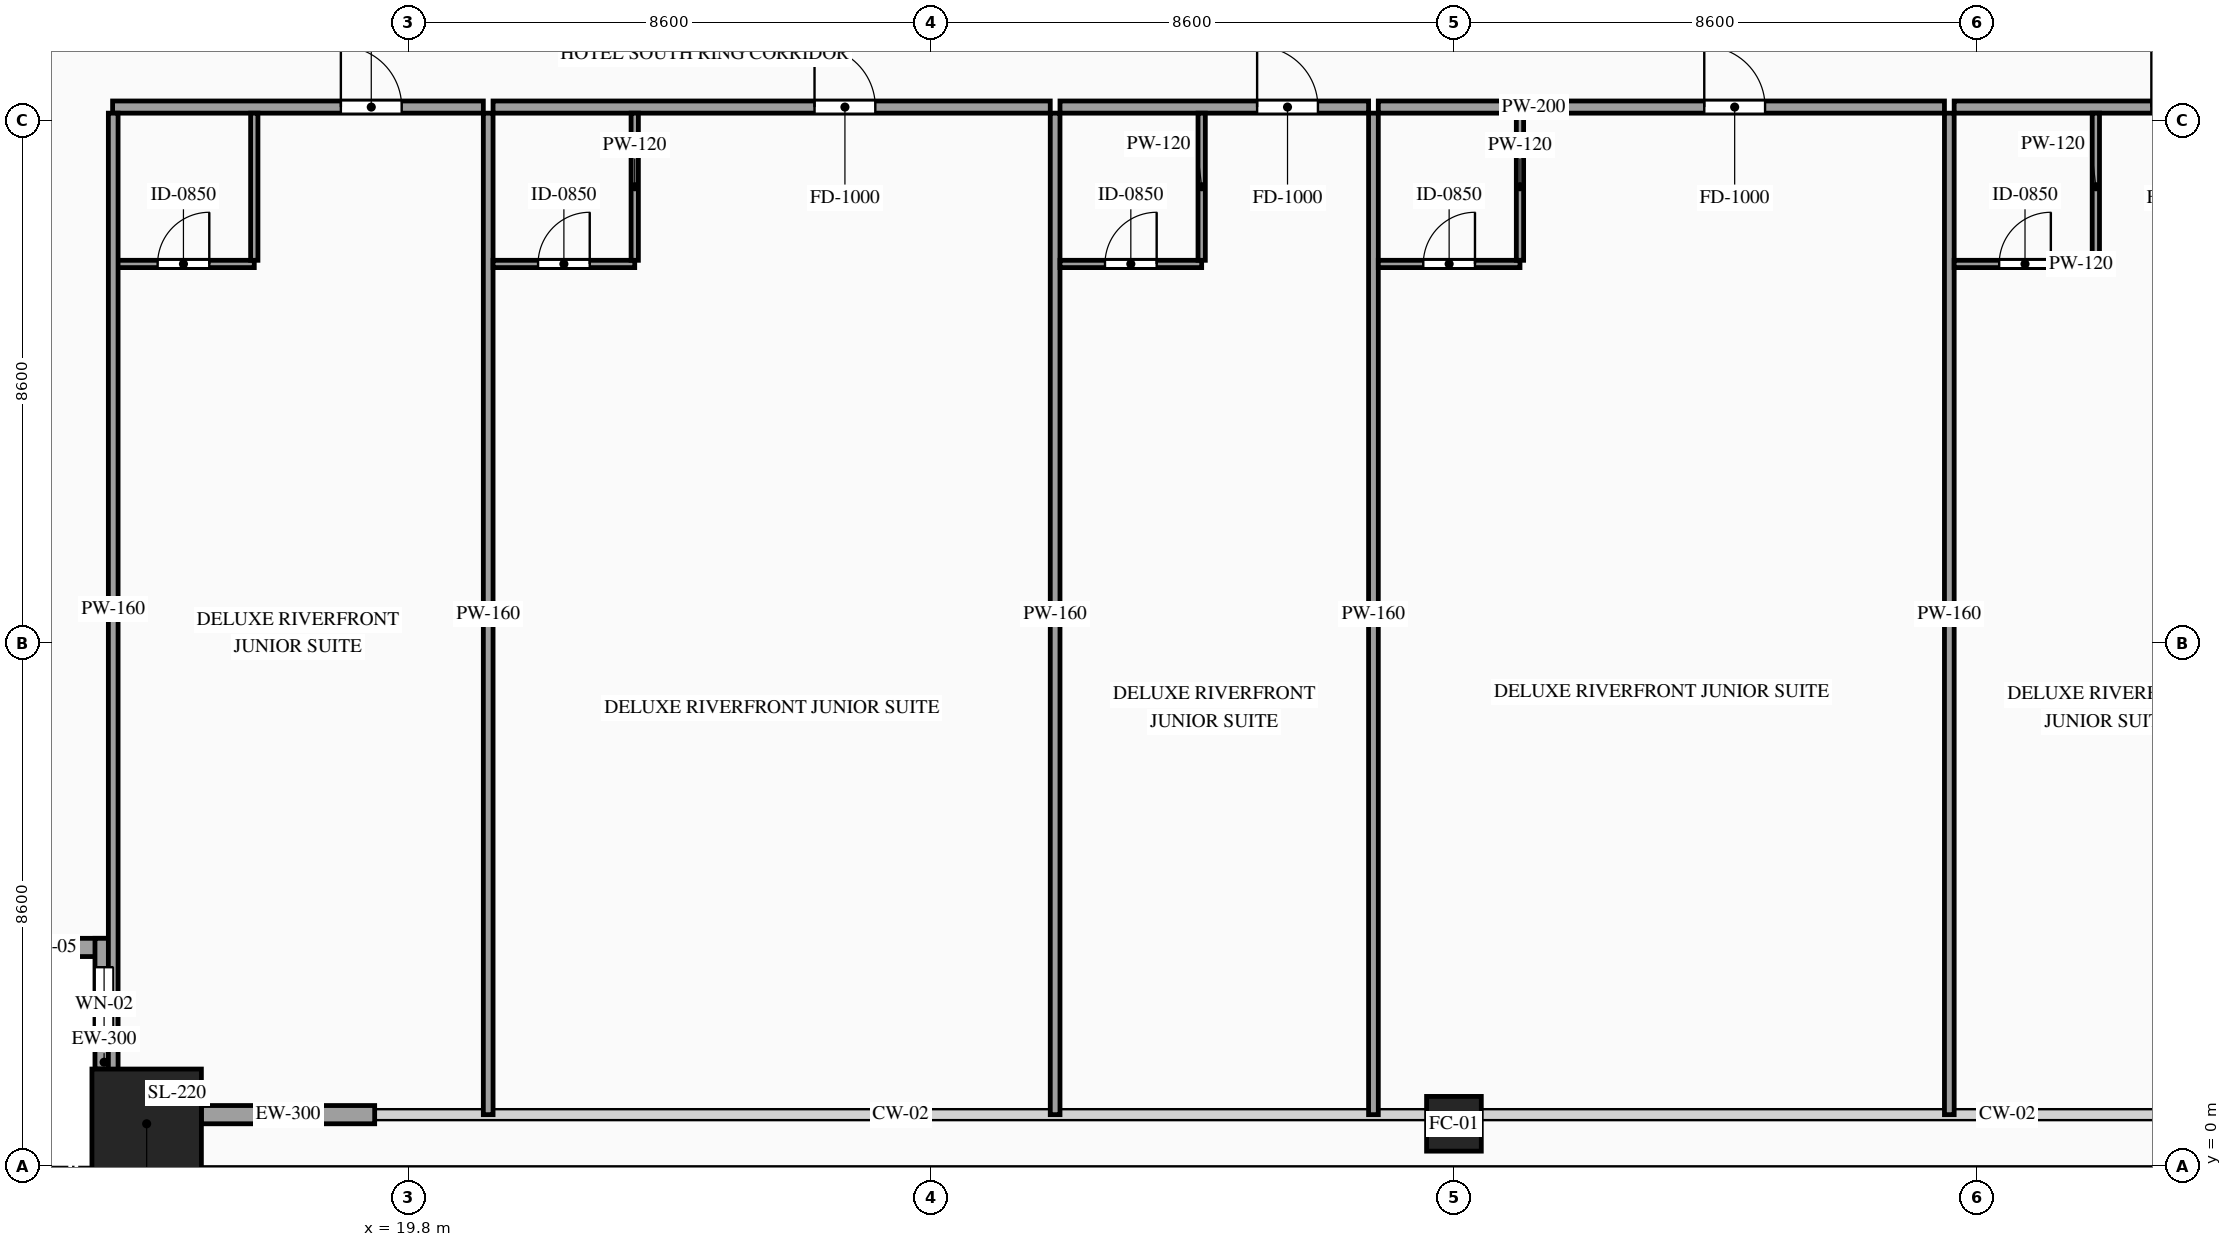
"""IFC4 building model, lengths in metres.
Left out: names, types, materials, properties, quantities, classifications, styles, units other than length and angle.
Written with IfcOpenShell. Run it as: python <this file> out.ifc"""

import sys

from ifc_helpers import new_model, si_unit, direction, frame, frame_2d, origin, origin_2d, place, context, subcontext, project, spatial, rectangle, hollow_rectangle, extrude, source, transform, mapped, element, fill, save


model = new_model("IFC4")
c1 = context("Model", 3, precision=1e-05, world=origin(), true_north=direction((0.0, 1.0)))
c2 = subcontext(c1, "Body", "Model", "MODEL_VIEW")
j1 = project(units=[si_unit("LENGTHUNIT", "METRE"), si_unit("PLANEANGLEUNIT", "RADIAN")], contexts=[c1])
p1 = place(None, origin())
s1 = spatial("IfcSite", under=j1, at=p1, CompositionType="ELEMENT")
p2 = place(p1, origin())
s2 = spatial("IfcBuilding", under=s1, at=p2, CompositionType="ELEMENT")
p3 = place(p2, frame((0.0, 0.0, 60.4)))
s3 = spatial("IfcBuildingStorey", under=s2, at=p3, CompositionType="ELEMENT", Elevation=60.4)
m1 = source(origin(), c2, "Body", "SweptSolid", [
    extrude(hollow_rectangle(XDim=1.8, YDim=1.8, WallThickness=0.08, at=origin_2d()), origin(), (0.0, 0.0, 1.0), 3.6),
])
p4 = place(p3, frame((15.5, 0.7, 0.0), z_axis=(0.0, 0.0, 1.0), x_axis=(1.0, 0.0, 0.0)))
e1 = element("IfcColumn", 1, at=p4, inside=s3, PredefinedType="COLUMN", context=c2, shape_type="MappedRepresentation", body=[
    mapped(m1, transform((0.0, 0.0, 0.0), scale=1.0)),
])
m2 = source(origin(), c2, "Body", "SweptSolid", [
    extrude(hollow_rectangle(XDim=0.9, YDim=0.9, WallThickness=0.042, at=origin_2d()), origin(), (0.0, 0.0, 1.0), 3.6),
])
p5 = place(p3, frame((37.0, 0.7, 0.0), z_axis=(0.0, 0.0, 1.0), x_axis=(1.0, 0.0, 0.0)))
e2 = element("IfcColumn", 2, at=p5, inside=s3, PredefinedType="COLUMN", context=c2, shape_type="MappedRepresentation", body=[
    mapped(m2, transform((0.0, 0.0, 0.0), scale=1.0)),
])
p6 = place(p3, frame((12.8, 3.6, 0.0), z_axis=(0.0, 0.0, 1.0), x_axis=(1.0, 0.0, 0.0)))
e3 = element("IfcWall", 3, at=p6, inside=s3, PredefinedType="SOLIDWALL", context=c2, shape_type="SweptSolid", body=[
    extrude(rectangle(XDim=2.15, YDim=0.3, at=frame_2d((1.075, 0.0))), origin(), (0.0, 0.0, 1.0), 3.38),
])
p7 = place(p6, frame((0.625, 0.0, 0.85)))
e4 = element("IfcOpeningElement", 4, at=p7, cuts=e3, PredefinedType="OPENING", context=c2, shape_type="SweptSolid", body=[
    extrude(rectangle(XDim=0.9, YDim=1.5, at=frame_2d((0.45, 0.75))), frame((0.0, 0.165, 0.0), z_axis=(0.0, -1.0, 0.0), x_axis=(1.0, 0.0, 0.0)), (0.0, 0.0, 1.0), 0.33),
])
p8 = place(p3, frame((14.8, 3.75, 0.0), z_axis=(0.0, 0.0, 1.0), x_axis=(0.0, -1.0, 0.0)))
e5 = element("IfcWall", 5, at=p8, inside=s3, PredefinedType="SOLIDWALL", context=c2, shape_type="SweptSolid", body=[
    extrude(rectangle(XDim=2.15, YDim=0.3, at=frame_2d((1.075, 0.0))), origin(), (0.0, 0.0, 1.0), 3.38),
])
p9 = place(p8, frame((0.475, 0.0, 0.85)))
e6 = element("IfcOpeningElement", 6, at=p9, cuts=e5, PredefinedType="OPENING", context=c2, shape_type="SweptSolid", body=[
    extrude(rectangle(XDim=1.2, YDim=2.1, at=frame_2d((0.6, 1.05))), frame((0.0, 0.165, 0.0), z_axis=(0.0, -1.0, 0.0), x_axis=(1.0, 0.0, 0.0)), (0.0, 0.0, 1.0), 0.33),
])
m3 = source(origin(), c2, "Body", "SweptSolid", [
    extrude(rectangle(XDim=2.85, YDim=0.3, at=frame_2d((1.425, 0.0))), origin(), (0.0, 0.0, 1.0), 2.775),
])
p10 = place(p3, frame((16.4, 0.85, 0.0), z_axis=(0.0, 0.0, 1.0), x_axis=(1.0, 0.0, 0.0)))
e7 = element("IfcWall", 7, at=p10, inside=s3, PredefinedType="SOLIDWALL", context=c2, shape_type="MappedRepresentation", body=[
    mapped(m3, transform((0.0, 0.0, 0.0), scale=1.0)),
])
p11 = place(p3, frame((14.94, 17.42, 0.0), z_axis=(0.0, 0.0, 1.0), x_axis=(1.0, 0.0, 0.0)))
e8 = element("IfcWall", 8, at=p11, inside=s3, PredefinedType="PARTITIONING", context=c2, shape_type="SweptSolid", body=[
    extrude(rectangle(XDim=6.097, YDim=0.2, at=frame_2d((3.049, 0.0))), origin(), (0.0, 0.0, 1.0), 3.38),
])
p12 = place(p11, frame((3.754, 0.0, 0.0)))
e9 = element("IfcOpeningElement", 9, at=p12, cuts=e8, PredefinedType="OPENING", context=c2, shape_type="SweptSolid", body=[
    extrude(rectangle(XDim=1.0, YDim=2.2, at=frame_2d((0.5, 1.1))), frame((0.0, 0.115, 0.0), z_axis=(0.0, -1.0, 0.0), x_axis=(1.0, 0.0, 0.0)), (0.0, 0.0, 1.0), 0.23),
])
m4 = source(origin(), c2, "Body", "SweptSolid", [
    extrude(rectangle(XDim=16.47, YDim=0.16, at=frame_2d((8.235, 0.0))), origin(), (0.0, 0.0, 1.0), 3.38),
])
p13 = place(p3, frame((21.117, 0.85, 0.0), z_axis=(0.0, 0.0, 1.0), x_axis=(0.0, 1.0, 0.0)))
e10 = element("IfcWall", 10, at=p13, inside=s3, PredefinedType="PARTITIONING", context=c2, shape_type="MappedRepresentation", body=[
    mapped(m4, transform((0.0, 0.0, 0.0), scale=1.0)),
])
p14 = place(p3, frame((14.94, 14.84, 0.0), z_axis=(0.0, 0.0, 1.0), x_axis=(1.0, 0.0, 0.0)))
e11 = element("IfcWall", 11, at=p14, inside=s3, PredefinedType="PARTITIONING", context=c2, shape_type="SweptSolid", body=[
    extrude(rectangle(XDim=2.33, YDim=0.12, at=frame_2d((1.165, 0.0))), origin(), (0.0, 0.0, 1.0), 3.38),
])
p15 = place(p14, frame((0.74, 0.0, 0.0)))
e12 = element("IfcOpeningElement", 12, at=p15, cuts=e11, PredefinedType="OPENING", context=c2, shape_type="SweptSolid", body=[
    extrude(rectangle(XDim=0.85, YDim=2.1, at=frame_2d((0.425, 1.05))), frame((0.0, 0.075, 0.0), z_axis=(0.0, -1.0, 0.0), x_axis=(1.0, 0.0, 0.0)), (0.0, 0.0, 1.0), 0.15),
])
m5 = source(origin(), c2, "Body", "SweptSolid", [
    extrude(rectangle(XDim=2.42, YDim=0.12, at=frame_2d((1.21, 0.0))), origin(), (0.0, 0.0, 1.0), 3.38),
])
p16 = place(p3, frame((17.27, 14.9, 0.0), z_axis=(0.0, 0.0, 1.0), x_axis=(0.0, 1.0, 0.0)))
e13 = element("IfcWall", 13, at=p16, inside=s3, PredefinedType="PARTITIONING", context=c2, shape_type="MappedRepresentation", body=[
    mapped(m5, transform((0.0, 0.0, 0.0), scale=1.0)),
])
p17 = place(p3, frame((21.197, 17.42, 0.0), z_axis=(0.0, 0.0, 1.0), x_axis=(1.0, 0.0, 0.0)))
e14 = element("IfcWall", 14, at=p17, inside=s3, PredefinedType="PARTITIONING", context=c2, shape_type="SweptSolid", body=[
    extrude(rectangle(XDim=9.164, YDim=0.2, at=frame_2d((4.582, 0.0))), origin(), (0.0, 0.0, 1.0), 3.38),
])
p18 = place(p17, frame((5.287, 0.0, 0.0)))
e15 = element("IfcOpeningElement", 15, at=p18, cuts=e14, PredefinedType="OPENING", context=c2, shape_type="SweptSolid", body=[
    extrude(rectangle(XDim=1.0, YDim=2.2, at=frame_2d((0.5, 1.1))), frame((0.0, 0.115, 0.0), z_axis=(0.0, -1.0, 0.0), x_axis=(1.0, 0.0, 0.0)), (0.0, 0.0, 1.0), 0.23),
])
p19 = place(p3, frame((30.441, 0.85, 0.0), z_axis=(0.0, 0.0, 1.0), x_axis=(0.0, 1.0, 0.0)))
e16 = element("IfcWall", 16, at=p19, inside=s3, PredefinedType="PARTITIONING", context=c2, shape_type="MappedRepresentation", body=[
    mapped(m4, transform((0.0, 0.0, 0.0), scale=1.0)),
])
p20 = place(p3, frame((21.197, 14.84, 0.0), z_axis=(0.0, 0.0, 1.0), x_axis=(1.0, 0.0, 0.0)))
e17 = element("IfcWall", 17, at=p20, inside=s3, PredefinedType="PARTITIONING", context=c2, shape_type="SweptSolid", body=[
    extrude(rectangle(XDim=2.33, YDim=0.12, at=frame_2d((1.165, 0.0))), origin(), (0.0, 0.0, 1.0), 3.38),
])
p21 = place(p20, frame((0.74, 0.0, 0.0)))
e18 = element("IfcOpeningElement", 18, at=p21, cuts=e17, PredefinedType="OPENING", context=c2, shape_type="SweptSolid", body=[
    extrude(rectangle(XDim=0.85, YDim=2.1, at=frame_2d((0.425, 1.05))), frame((0.0, 0.075, 0.0), z_axis=(0.0, -1.0, 0.0), x_axis=(1.0, 0.0, 0.0)), (0.0, 0.0, 1.0), 0.15),
])
p22 = place(p3, frame((23.527, 14.9, 0.0), z_axis=(0.0, 0.0, 1.0), x_axis=(0.0, 1.0, 0.0)))
e19 = element("IfcWall", 19, at=p22, inside=s3, PredefinedType="PARTITIONING", context=c2, shape_type="MappedRepresentation", body=[
    mapped(m5, transform((0.0, 0.0, 0.0), scale=1.0)),
])
p23 = place(p3, frame((30.521, 17.42, 0.0), z_axis=(0.0, 0.0, 1.0), x_axis=(1.0, 0.0, 0.0)))
e20 = element("IfcWall", 20, at=p23, inside=s3, PredefinedType="PARTITIONING", context=c2, shape_type="SweptSolid", body=[
    extrude(rectangle(XDim=5.075, YDim=0.2, at=frame_2d((2.538, 0.0))), origin(), (0.0, 0.0, 1.0), 3.38),
])
p24 = place(p23, frame((3.242, 0.0, 0.0)))
e21 = element("IfcOpeningElement", 21, at=p24, cuts=e20, PredefinedType="OPENING", context=c2, shape_type="SweptSolid", body=[
    extrude(rectangle(XDim=1.0, YDim=2.2, at=frame_2d((0.5, 1.1))), frame((0.0, 0.115, 0.0), z_axis=(0.0, -1.0, 0.0), x_axis=(1.0, 0.0, 0.0)), (0.0, 0.0, 1.0), 0.23),
])
p25 = place(p3, frame((35.676, 0.85, 0.0), z_axis=(0.0, 0.0, 1.0), x_axis=(0.0, 1.0, 0.0)))
e22 = element("IfcWall", 22, at=p25, inside=s3, PredefinedType="PARTITIONING", context=c2, shape_type="MappedRepresentation", body=[
    mapped(m4, transform((0.0, 0.0, 0.0), scale=1.0)),
])
p26 = place(p3, frame((30.521, 14.84, 0.0), z_axis=(0.0, 0.0, 1.0), x_axis=(1.0, 0.0, 0.0)))
e23 = element("IfcWall", 23, at=p26, inside=s3, PredefinedType="PARTITIONING", context=c2, shape_type="SweptSolid", body=[
    extrude(rectangle(XDim=2.33, YDim=0.12, at=frame_2d((1.165, 0.0))), origin(), (0.0, 0.0, 1.0), 3.38),
])
p27 = place(p26, frame((0.74, 0.0, 0.0)))
e24 = element("IfcOpeningElement", 24, at=p27, cuts=e23, PredefinedType="OPENING", context=c2, shape_type="SweptSolid", body=[
    extrude(rectangle(XDim=0.85, YDim=2.1, at=frame_2d((0.425, 1.05))), frame((0.0, 0.075, 0.0), z_axis=(0.0, -1.0, 0.0), x_axis=(1.0, 0.0, 0.0)), (0.0, 0.0, 1.0), 0.15),
])
p28 = place(p3, frame((32.851, 14.9, 0.0), z_axis=(0.0, 0.0, 1.0), x_axis=(0.0, 1.0, 0.0)))
e25 = element("IfcWall", 25, at=p28, inside=s3, PredefinedType="PARTITIONING", context=c2, shape_type="MappedRepresentation", body=[
    mapped(m5, transform((0.0, 0.0, 0.0), scale=1.0)),
])
p29 = place(p3, frame((35.756, 17.42, 0.0), z_axis=(0.0, 0.0, 1.0), x_axis=(1.0, 0.0, 0.0)))
e26 = element("IfcWall", 26, at=p29, inside=s3, PredefinedType="PARTITIONING", context=c2, shape_type="SweptSolid", body=[
    extrude(rectangle(XDim=9.311, YDim=0.2, at=frame_2d((4.655, 0.0))), origin(), (0.0, 0.0, 1.0), 3.38),
])
p30 = place(p29, frame((5.361, 0.0, 0.0)))
e27 = element("IfcOpeningElement", 27, at=p30, cuts=e26, PredefinedType="OPENING", context=c2, shape_type="SweptSolid", body=[
    extrude(rectangle(XDim=1.0, YDim=2.2, at=frame_2d((0.5, 1.1))), frame((0.0, 0.115, 0.0), z_axis=(0.0, -1.0, 0.0), x_axis=(1.0, 0.0, 0.0)), (0.0, 0.0, 1.0), 0.23),
])
p31 = place(p3, frame((45.147, 0.85, 0.0), z_axis=(0.0, 0.0, 1.0), x_axis=(0.0, 1.0, 0.0)))
e28 = element("IfcWall", 28, at=p31, inside=s3, PredefinedType="PARTITIONING", context=c2, shape_type="MappedRepresentation", body=[
    mapped(m4, transform((0.0, 0.0, 0.0), scale=1.0)),
])
p32 = place(p3, frame((35.756, 14.84, 0.0), z_axis=(0.0, 0.0, 1.0), x_axis=(1.0, 0.0, 0.0)))
e29 = element("IfcWall", 29, at=p32, inside=s3, PredefinedType="PARTITIONING", context=c2, shape_type="SweptSolid", body=[
    extrude(rectangle(XDim=2.33, YDim=0.12, at=frame_2d((1.165, 0.0))), origin(), (0.0, 0.0, 1.0), 3.38),
])
p33 = place(p32, frame((0.74, 0.0, 0.0)))
e30 = element("IfcOpeningElement", 30, at=p33, cuts=e29, PredefinedType="OPENING", context=c2, shape_type="SweptSolid", body=[
    extrude(rectangle(XDim=0.85, YDim=2.1, at=frame_2d((0.425, 1.05))), frame((0.0, 0.075, 0.0), z_axis=(0.0, -1.0, 0.0), x_axis=(1.0, 0.0, 0.0)), (0.0, 0.0, 1.0), 0.15),
])
p34 = place(p3, frame((38.086, 14.9, 0.0), z_axis=(0.0, 0.0, 1.0), x_axis=(0.0, 1.0, 0.0)))
e31 = element("IfcWall", 31, at=p34, inside=s3, PredefinedType="PARTITIONING", context=c2, shape_type="MappedRepresentation", body=[
    mapped(m5, transform((0.0, 0.0, 0.0), scale=1.0)),
])
p35 = place(p3, frame((45.227, 17.42, 0.0), z_axis=(0.0, 0.0, 1.0), x_axis=(1.0, 0.0, 0.0)))
e32 = element("IfcWall", 32, at=p35, inside=s3, PredefinedType="PARTITIONING", context=c2, shape_type="SweptSolid", body=[
    extrude(rectangle(XDim=5.076, YDim=0.2, at=frame_2d((2.538, 0.0))), origin(), (0.0, 0.0, 1.0), 3.38),
])
p36 = place(p35, frame((3.243, 0.0, 0.0)))
e33 = element("IfcOpeningElement", 33, at=p36, cuts=e32, PredefinedType="OPENING", context=c2, shape_type="SweptSolid", body=[
    extrude(rectangle(XDim=1.0, YDim=2.2, at=frame_2d((0.5, 1.1))), frame((0.0, 0.115, 0.0), z_axis=(0.0, -1.0, 0.0), x_axis=(1.0, 0.0, 0.0)), (0.0, 0.0, 1.0), 0.23),
])
p37 = place(p3, frame((45.227, 14.84, 0.0), z_axis=(0.0, 0.0, 1.0), x_axis=(1.0, 0.0, 0.0)))
e34 = element("IfcWall", 34, at=p37, inside=s3, PredefinedType="PARTITIONING", context=c2, shape_type="SweptSolid", body=[
    extrude(rectangle(XDim=2.33, YDim=0.12, at=frame_2d((1.165, 0.0))), origin(), (0.0, 0.0, 1.0), 3.38),
])
p38 = place(p37, frame((0.74, 0.0, 0.0)))
e35 = element("IfcOpeningElement", 35, at=p38, cuts=e34, PredefinedType="OPENING", context=c2, shape_type="SweptSolid", body=[
    extrude(rectangle(XDim=0.85, YDim=2.1, at=frame_2d((0.425, 1.05))), frame((0.0, 0.075, 0.0), z_axis=(0.0, -1.0, 0.0), x_axis=(1.0, 0.0, 0.0)), (0.0, 0.0, 1.0), 0.15),
])
p39 = place(p3, frame((47.557, 14.9, 0.0), z_axis=(0.0, 0.0, 1.0), x_axis=(0.0, 1.0, 0.0)))
e36 = element("IfcWall", 36, at=p39, inside=s3, PredefinedType="PARTITIONING", context=c2, shape_type="MappedRepresentation", body=[
    mapped(m5, transform((0.0, 0.0, 0.0), scale=1.0)),
])
m6 = source(origin(), c2, "Body", "SweptSolid", [
    extrude(rectangle(XDim=16.32, YDim=0.16, at=frame_2d((8.16, 0.0))), origin(), (0.0, 0.0, 1.0), 3.38),
])
p40 = place(p3, frame((14.95, 1.0, 0.0), z_axis=(0.0, 0.0, 1.0), x_axis=(0.0, 1.0, 0.0)))
e37 = element("IfcWall", 37, at=p40, inside=s3, PredefinedType="PARTITIONING", context=c2, shape_type="MappedRepresentation", body=[
    mapped(m6, transform((0.0, 0.0, 0.0), scale=1.0)),
])
m7 = source(origin(), c2, "Body", "SweptSolid", [
    extrude(rectangle(XDim=0.9, YDim=1.5, at=frame_2d((0.45, 0.75))), frame((0.0, 0.03, 0.0), z_axis=(0.0, -1.0, 0.0), x_axis=(1.0, 0.0, 0.0)), (0.0, 0.0, 1.0), 0.06),
])
p41 = place(p7, origin())
e38 = element("IfcWindow", 38, at=p41, inside=s3, PartitioningType="SINGLE_PANEL", PredefinedType="WINDOW", context=c2, shape_type="MappedRepresentation", body=[
    mapped(m7, transform((0.0, 0.0, 0.0), scale=1.0)),
])
fill(e4, e38)
m8 = source(origin(), c2, "Body", "SweptSolid", [
    extrude(rectangle(XDim=1.2, YDim=2.1, at=frame_2d((0.6, 1.05))), frame((0.0, 0.03, 0.0), z_axis=(0.0, -1.0, 0.0), x_axis=(1.0, 0.0, 0.0)), (0.0, 0.0, 1.0), 0.06),
])
p42 = place(p9, origin())
e39 = element("IfcWindow", 39, at=p42, inside=s3, PartitioningType="SINGLE_PANEL", PredefinedType="WINDOW", context=c2, shape_type="MappedRepresentation", body=[
    mapped(m8, transform((0.0, 0.0, 0.0), scale=1.0)),
])
fill(e6, e39)
m9 = source(origin(), c2, "Body", "SweptSolid", [
    extrude(rectangle(XDim=1.0, YDim=2.2, at=frame_2d((0.5, 1.1))), frame((0.0, 0.025, 0.0), z_axis=(0.0, -1.0, 0.0), x_axis=(1.0, 0.0, 0.0)), (0.0, 0.0, 1.0), 0.05),
])
p43 = place(p12, origin())
e40 = element("IfcDoor", 40, at=p43, inside=s3, OperationType="SINGLE_SWING_LEFT", PredefinedType="DOOR", context=c2, shape_type="MappedRepresentation", body=[
    mapped(m9, transform((0.0, 0.0, 0.0), scale=1.0)),
])
fill(e9, e40)
m10 = source(origin(), c2, "Body", "SweptSolid", [
    extrude(rectangle(XDim=0.85, YDim=2.1, at=frame_2d((0.425, 1.05))), frame((0.0, 0.025, 0.0), z_axis=(0.0, -1.0, 0.0), x_axis=(1.0, 0.0, 0.0)), (0.0, 0.0, 1.0), 0.05),
])
p44 = place(p15, origin())
e41 = element("IfcDoor", 41, at=p44, inside=s3, OperationType="SINGLE_SWING_RIGHT", PredefinedType="DOOR", context=c2, shape_type="MappedRepresentation", body=[
    mapped(m10, transform((0.0, 0.0, 0.0), scale=1.0)),
])
fill(e12, e41)
p45 = place(p18, origin())
e42 = element("IfcDoor", 42, at=p45, inside=s3, OperationType="SINGLE_SWING_LEFT", PredefinedType="DOOR", context=c2, shape_type="MappedRepresentation", body=[
    mapped(m9, transform((0.0, 0.0, 0.0), scale=1.0)),
])
fill(e15, e42)
p46 = place(p21, origin())
e43 = element("IfcDoor", 43, at=p46, inside=s3, OperationType="SINGLE_SWING_RIGHT", PredefinedType="DOOR", context=c2, shape_type="MappedRepresentation", body=[
    mapped(m10, transform((0.0, 0.0, 0.0), scale=1.0)),
])
fill(e18, e43)
p47 = place(p24, origin())
e44 = element("IfcDoor", 44, at=p47, inside=s3, OperationType="SINGLE_SWING_LEFT", PredefinedType="DOOR", context=c2, shape_type="MappedRepresentation", body=[
    mapped(m9, transform((0.0, 0.0, 0.0), scale=1.0)),
])
fill(e21, e44)
p48 = place(p27, origin())
e45 = element("IfcDoor", 45, at=p48, inside=s3, OperationType="SINGLE_SWING_RIGHT", PredefinedType="DOOR", context=c2, shape_type="MappedRepresentation", body=[
    mapped(m10, transform((0.0, 0.0, 0.0), scale=1.0)),
])
fill(e24, e45)
p49 = place(p30, origin())
e46 = element("IfcDoor", 46, at=p49, inside=s3, OperationType="SINGLE_SWING_LEFT", PredefinedType="DOOR", context=c2, shape_type="MappedRepresentation", body=[
    mapped(m9, transform((0.0, 0.0, 0.0), scale=1.0)),
])
fill(e27, e46)
p50 = place(p33, origin())
e47 = element("IfcDoor", 47, at=p50, inside=s3, OperationType="SINGLE_SWING_RIGHT", PredefinedType="DOOR", context=c2, shape_type="MappedRepresentation", body=[
    mapped(m10, transform((0.0, 0.0, 0.0), scale=1.0)),
])
fill(e30, e47)
p51 = place(p36, origin())
e48 = element("IfcDoor", 48, at=p51, inside=s3, OperationType="SINGLE_SWING_LEFT", PredefinedType="DOOR", context=c2, shape_type="MappedRepresentation", body=[
    mapped(m9, transform((0.0, 0.0, 0.0), scale=1.0)),
])
fill(e33, e48)
p52 = place(p38, origin())
e49 = element("IfcDoor", 49, at=p52, inside=s3, OperationType="SINGLE_SWING_RIGHT", PredefinedType="DOOR", context=c2, shape_type="MappedRepresentation", body=[
    mapped(m10, transform((0.0, 0.0, 0.0), scale=1.0)),
])
fill(e35, e49)
save(model, sys.argv[1])
